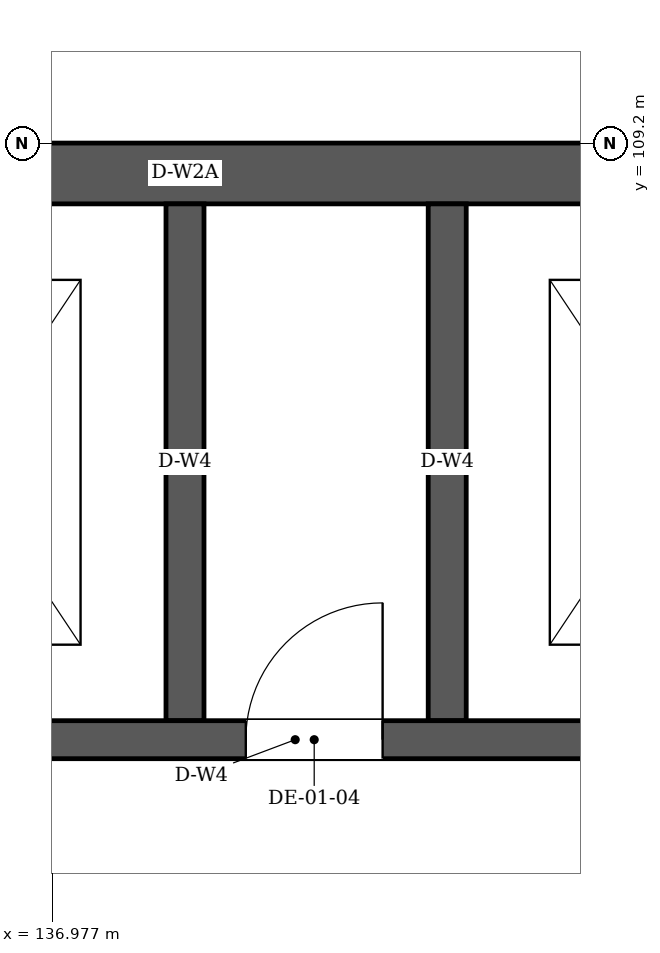
"""IFC4 building model, lengths in metres.
Left out: names, types, materials, properties, quantities, classifications, styles, units other than length and angle.
Written with IfcOpenShell. Run it as: python <this file> out.ifc"""

import sys

from ifc_helpers import new_model, si_unit, direction, frame, frame_2d, origin, place, context, subcontext, project, spatial, rectangle, extrude, element, fill, save


model = new_model("IFC4")
c1 = context("Model", 3, precision=1e-05, world=origin(), true_north=direction((0.0, 1.0)))
c2 = subcontext(c1, "Body", "Model", "MODEL_VIEW")
j1 = project(units=[si_unit("LENGTHUNIT", "METRE"), si_unit("PLANEANGLEUNIT", "RADIAN")], contexts=[c1])
p1 = place(None, origin())
s1 = spatial("IfcSite", under=j1, at=p1, CompositionType="ELEMENT")
p2 = place(p1, origin())
s2 = spatial("IfcBuilding", under=s1, at=p2, CompositionType="ELEMENT")
p3 = place(p2, frame((0.0, 0.0, 6.0)))
s3 = spatial("IfcBuildingStorey", under=s2, at=p3, CompositionType="ELEMENT", Elevation=6.0)
p4 = place(p3, frame((126.0, 109.0, 0.0), z_axis=(0.0, 0.0, 1.0), x_axis=(1.0, 0.0, 0.0)))
e1 = element("IfcWall", 1, at=p4, inside=s3, PredefinedType="SOLIDWALL", context=c2, shape_type="SweptSolid", body=[
    extrude(rectangle(XDim=16.8, YDim=0.4, at=frame_2d((8.4, 0.0))), origin(), (0.0, 0.0, 1.0), 3.92),
])
p5 = place(p3, frame((134.75, 105.275, 0.0), z_axis=(0.0, 0.0, 1.0), x_axis=(1.0, 0.0, 0.0)))
e2 = element("IfcWall", 2, at=p5, inside=s3, PredefinedType="SOLIDWALL", context=c2, shape_type="SweptSolid", body=[
    extrude(rectangle(XDim=7.65, YDim=0.25, at=frame_2d((3.825, 0.0))), origin(), (0.0, 0.0, 1.0), 3.92),
])
p6 = place(p5, frame((1.05, 0.0, 0.0)))
e3 = element("IfcOpeningElement", 3, at=p6, cuts=e2, PredefinedType="OPENING", context=c2, shape_type="SweptSolid", body=[
    extrude(rectangle(XDim=1.1, YDim=2.1, at=frame_2d((0.55, 1.05))), frame((0.0, 0.135, 0.0), z_axis=(0.0, -1.0, 0.0), x_axis=(1.0, 0.0, 0.0)), (0.0, 0.0, 1.0), 0.27),
])
p7 = place(p5, frame((5.75, 0.0, 0.0)))
e4 = element("IfcOpeningElement", 4, at=p7, cuts=e2, PredefinedType="OPENING", context=c2, shape_type="SweptSolid", body=[
    extrude(rectangle(XDim=1.1, YDim=2.1, at=frame_2d((0.55, 1.05))), frame((0.0, 0.135, 0.0), z_axis=(0.0, -1.0, 0.0), x_axis=(1.0, 0.0, 0.0)), (0.0, 0.0, 1.0), 0.27),
])
p8 = place(p5, frame((3.5, 0.0, 0.0)))
e5 = element("IfcOpeningElement", 5, at=p8, cuts=e2, PredefinedType="OPENING", context=c2, shape_type="SweptSolid", body=[
    extrude(rectangle(XDim=0.9, YDim=2.1, at=frame_2d((0.45, 1.05))), frame((0.0, 0.135, 0.0), z_axis=(0.0, -1.0, 0.0), x_axis=(1.0, 0.0, 0.0)), (0.0, 0.0, 1.0), 0.27),
])
for number, where, z_axis, x_axis in (
    (6, (137.85, 105.4, 0.0), (0.0, 0.0, 1.0), (0.0, 1.0, 0.0)),
    (7, (139.575, 105.4, 0.0), (0.0, 0.0, 1.0), (0.0, 1.0, 0.0)),
):
    element("IfcWall", number, at=place(p3, frame(where, z_axis=z_axis, x_axis=x_axis)), inside=s3, PredefinedType="SOLIDWALL", context=c2, shape_type="SweptSolid", body=[
        extrude(rectangle(XDim=3.4, YDim=0.25, at=frame_2d((1.7, 0.0))), origin(), (0.0, 0.0, 1.0), 3.92),
    ])
p9 = place(p8, origin())
e8 = element("IfcDoor", 8, at=p9, inside=s3, OperationType="SINGLE_SWING_LEFT", PredefinedType="DOOR", context=c2, shape_type="SweptSolid", body=[
    extrude(rectangle(XDim=0.9, YDim=2.1, at=frame_2d((0.45, 1.05))), frame((0.0, 0.025, 0.0), z_axis=(0.0, -1.0, 0.0), x_axis=(1.0, 0.0, 0.0)), (0.0, 0.0, 1.0), 0.05),
])
fill(e5, e8)
save(model, sys.argv[1])
